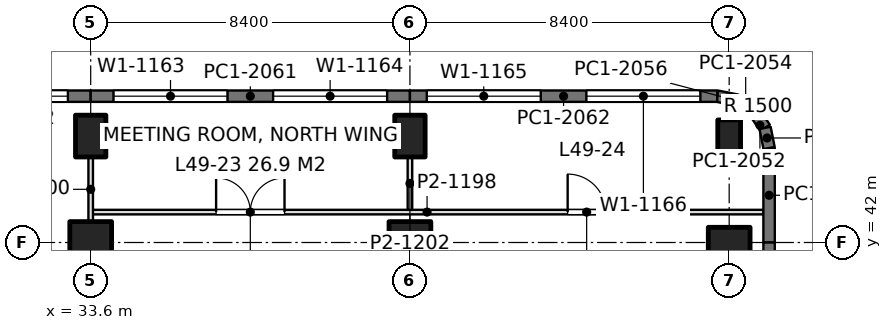
"""IFC4 building model, lengths in metres.
Left out: names, types, materials, properties, quantities, classifications, styles, units other than length and angle.
Written with IfcOpenShell. Run it as: python <this file> out.ifc"""

import sys

from ifc_helpers import new_model, si_unit, direction, frame, frame_2d, origin, origin_2d, place, context, subcontext, project, spatial, rectangle, extrude, element, fill, save


model = new_model("IFC4")
c1 = context("Model", 3, precision=1e-05, world=origin(), true_north=direction((0.0, 1.0)))
c2 = subcontext(c1, "Body", "Model", "MODEL_VIEW")
j1 = project(units=[si_unit("LENGTHUNIT", "METRE"), si_unit("PLANEANGLEUNIT", "RADIAN")], contexts=[c1])
p1 = place(None, origin())
s1 = spatial("IfcSite", under=j1, at=p1, CompositionType="ELEMENT")
p2 = place(p1, origin())
s2 = spatial("IfcBuilding", under=s1, at=p2, CompositionType="ELEMENT")
p3 = place(p2, frame((0.0, 0.0, 215.4)))
s3 = spatial("IfcBuildingStorey", under=s2, at=p3, CompositionType="ELEMENT", Elevation=215.4)
p4 = place(p3, frame((33.6, 42.0, 0.0), z_axis=(0.0, 0.0, 1.0), x_axis=(1.0, 0.0, 0.0)))
e1 = element("IfcColumn", 1, at=p4, inside=s3, PredefinedType="COLUMN", context=c2, shape_type="SweptSolid", body=[
    extrude(rectangle(XDim=1.1, YDim=1.1, at=origin_2d()), origin(), (0.0, 0.0, 1.0), 4.2),
])
p5 = place(p3, frame((33.6, 44.8, 0.0), z_axis=(0.0, 0.0, 1.0), x_axis=(1.0, 0.0, 0.0)))
e2 = element("IfcColumn", 2, at=p5, inside=s3, PredefinedType="COLUMN", context=c2, shape_type="SweptSolid", body=[
    extrude(rectangle(XDim=0.8, YDim=1.1, at=origin_2d()), origin(), (0.0, 0.0, 1.0), 4.2),
])
p6 = place(p3, frame((42.0, 42.0, 0.0), z_axis=(0.0, 0.0, 1.0), x_axis=(1.0, 0.0, 0.0)))
e3 = element("IfcColumn", 3, at=p6, inside=s3, PredefinedType="COLUMN", context=c2, shape_type="SweptSolid", body=[
    extrude(rectangle(XDim=1.1, YDim=1.1, at=origin_2d()), origin(), (0.0, 0.0, 1.0), 4.2),
])
for number, where, z_axis, x_axis in (
    (4, (42.0, 44.8, 0.0), (0.0, 0.0, 1.0), (1.0, 0.0, 0.0)),
    (5, (50.4, 42.0, 0.0), (0.0, 0.0, 1.0), (0.0, 1.0, 0.0)),
):
    element("IfcColumn", number, at=place(p3, frame(where, z_axis=z_axis, x_axis=x_axis)), inside=s3, PredefinedType="COLUMN", context=c2, shape_type="SweptSolid", body=[
        extrude(rectangle(XDim=0.8, YDim=1.1, at=origin_2d()), origin(), (0.0, 0.0, 1.0), 4.2),
    ])
p7 = place(p3, frame((50.4, 44.8, 0.0), z_axis=(0.0, 0.0, 1.0), x_axis=(1.0, 0.0, 0.0)))
e6 = element("IfcColumn", 6, at=p7, inside=s3, PredefinedType="COLUMN", context=c2, shape_type="SweptSolid", body=[
    extrude(rectangle(XDim=0.6, YDim=0.85, at=origin_2d()), origin(), (0.0, 0.0, 1.0), 4.2),
])
p8 = place(p3, frame((25.2, 45.85, 0.0), z_axis=(0.0, 0.0, 1.0), x_axis=(1.0, 0.0, 0.0)))
e7 = element("IfcWall", 7, at=p8, inside=s3, PredefinedType="SOLIDWALL", context=c2, shape_type="SweptSolid", body=[
    extrude(rectangle(XDim=8.4, YDim=0.3, at=frame_2d((4.2, 0.0))), origin(), (0.0, 0.0, 1.0), 4.05),
])
p9 = place(p8, frame((0.6, 0.0, 0.9)))
e8 = element("IfcOpeningElement", 8, at=p9, cuts=e7, PredefinedType="OPENING", context=c2, shape_type="SweptSolid", body=[
    extrude(rectangle(XDim=3.0, YDim=1.9, at=frame_2d((1.5, 0.95))), frame((0.0, 0.16, 0.0), z_axis=(0.0, -1.0, 0.0), x_axis=(1.0, 0.0, 0.0)), (0.0, 0.0, 1.0), 0.32),
])
p10 = place(p8, frame((4.8, 0.0, 0.9)))
e9 = element("IfcOpeningElement", 9, at=p10, cuts=e7, PredefinedType="OPENING", context=c2, shape_type="SweptSolid", body=[
    extrude(rectangle(XDim=3.0, YDim=1.9, at=frame_2d((1.5, 0.95))), frame((0.0, 0.16, 0.0), z_axis=(0.0, -1.0, 0.0), x_axis=(1.0, 0.0, 0.0)), (0.0, 0.0, 1.0), 0.32),
])
p11 = place(p3, frame((33.6, 45.85, 0.0), z_axis=(0.0, 0.0, 1.0), x_axis=(1.0, 0.0, 0.0)))
e10 = element("IfcWall", 10, at=p11, inside=s3, PredefinedType="SOLIDWALL", context=c2, shape_type="SweptSolid", body=[
    extrude(rectangle(XDim=8.4, YDim=0.3, at=frame_2d((4.2, 0.0))), origin(), (0.0, 0.0, 1.0), 4.05),
])
p12 = place(p11, frame((0.6, 0.0, 0.9)))
e11 = element("IfcOpeningElement", 11, at=p12, cuts=e10, PredefinedType="OPENING", context=c2, shape_type="SweptSolid", body=[
    extrude(rectangle(XDim=3.0, YDim=1.9, at=frame_2d((1.5, 0.95))), frame((0.0, 0.16, 0.0), z_axis=(0.0, -1.0, 0.0), x_axis=(1.0, 0.0, 0.0)), (0.0, 0.0, 1.0), 0.32),
])
p13 = place(p11, frame((4.8, 0.0, 0.9)))
e12 = element("IfcOpeningElement", 12, at=p13, cuts=e10, PredefinedType="OPENING", context=c2, shape_type="SweptSolid", body=[
    extrude(rectangle(XDim=3.0, YDim=1.9, at=frame_2d((1.5, 0.95))), frame((0.0, 0.16, 0.0), z_axis=(0.0, -1.0, 0.0), x_axis=(1.0, 0.0, 0.0)), (0.0, 0.0, 1.0), 0.32),
])
p14 = place(p3, frame((42.0, 45.85, 0.0), z_axis=(0.0, 0.0, 1.0), x_axis=(1.0, 0.0, 0.0)))
e13 = element("IfcWall", 13, at=p14, inside=s3, PredefinedType="SOLIDWALL", context=c2, shape_type="SweptSolid", body=[
    extrude(rectangle(XDim=8.085, YDim=0.3, at=frame_2d((4.042, 0.0))), origin(), (0.0, 0.0, 1.0), 4.05),
])
p15 = place(p14, frame((0.443, 0.0, 0.9)))
e14 = element("IfcOpeningElement", 14, at=p15, cuts=e13, PredefinedType="OPENING", context=c2, shape_type="SweptSolid", body=[
    extrude(rectangle(XDim=3.0, YDim=1.9, at=frame_2d((1.5, 0.95))), frame((0.0, 0.16, 0.0), z_axis=(0.0, -1.0, 0.0), x_axis=(1.0, 0.0, 0.0)), (0.0, 0.0, 1.0), 0.32),
])
p16 = place(p14, frame((4.643, 0.0, 0.9)))
e15 = element("IfcOpeningElement", 15, at=p16, cuts=e13, PredefinedType="OPENING", context=c2, shape_type="SweptSolid", body=[
    extrude(rectangle(XDim=3.0, YDim=1.9, at=frame_2d((1.5, 0.95))), frame((0.0, 0.16, 0.0), z_axis=(0.0, -1.0, 0.0), x_axis=(1.0, 0.0, 0.0)), (0.0, 0.0, 1.0), 0.32),
])
p17 = place(p3, frame((50.085, 45.85, 0.0), z_axis=(0.0, 0.0, 1.0), x_axis=(0.980702050465, -0.1955082817, 0.0)))
e16 = element("IfcWall", 16, at=p17, inside=s3, PredefinedType="SOLIDWALL", context=c2, shape_type="SweptSolid", body=[
    extrude(rectangle(XDim=0.541, YDim=0.3, at=frame_2d((0.271, 0.0))), origin(), (0.0, 0.0, 1.0), 4.05),
])
p18 = place(p3, frame((50.615, 45.744, 0.0), z_axis=(0.0, 0.0, 1.0), x_axis=(0.831692711774, -0.555236195849, 0.0)))
e17 = element("IfcWall", 17, at=p18, inside=s3, PredefinedType="SOLIDWALL", context=c2, shape_type="SweptSolid", body=[
    extrude(rectangle(XDim=0.525, YDim=0.3, at=frame_2d((0.263, 0.0))), origin(), (0.0, 0.0, 1.0), 4.05),
])
p19 = place(p3, frame((51.052, 45.453, 0.0), z_axis=(0.0, 0.0, 1.0), x_axis=(0.55534295404, -0.831621430339, 0.0)))
e18 = element("IfcWall", 18, at=p19, inside=s3, PredefinedType="SOLIDWALL", context=c2, shape_type="SweptSolid", body=[
    extrude(rectangle(XDim=0.526, YDim=0.3, at=frame_2d((0.263, 0.0))), origin(), (0.0, 0.0, 1.0), 4.05),
])
p20 = place(p3, frame((51.344, 45.015, 0.0), z_axis=(0.0, 0.0, 1.0), x_axis=(0.195073962632, -0.980788534345, 0.0)))
e19 = element("IfcWall", 19, at=p20, inside=s3, PredefinedType="SOLIDWALL", context=c2, shape_type="SweptSolid", body=[
    extrude(rectangle(XDim=0.541, YDim=0.3, at=frame_2d((0.271, 0.0))), origin(), (0.0, 0.0, 1.0), 4.05),
])
p21 = place(p3, frame((51.45, 44.485, 0.0), z_axis=(0.0, 0.0, 1.0), x_axis=(0.0, -1.0, 0.0)))
e20 = element("IfcWall", 20, at=p21, inside=s3, PredefinedType="SOLIDWALL", context=c2, shape_type="SweptSolid", body=[
    extrude(rectangle(XDim=2.485, YDim=0.3, at=frame_2d((1.243, 0.0))), origin(), (0.0, 0.0, 1.0), 4.05),
])
p22 = place(p3, frame((51.45, 42.0, 0.0), z_axis=(0.0, 0.0, 1.0), x_axis=(0.0, -1.0, 0.0)))
e21 = element("IfcWall", 21, at=p22, inside=s3, PredefinedType="SOLIDWALL", context=c2, shape_type="SweptSolid", body=[
    extrude(rectangle(XDim=4.275, YDim=0.3, at=frame_2d((2.137, 0.0))), origin(), (0.0, 0.0, 1.0), 4.05),
])
p23 = place(p22, frame((0.938, 0.0, 0.9)))
e22 = element("IfcOpeningElement", 22, at=p23, cuts=e21, PredefinedType="OPENING", context=c2, shape_type="SweptSolid", body=[
    extrude(rectangle(XDim=2.4, YDim=1.9, at=frame_2d((1.2, 0.95))), frame((0.0, 0.16, 0.0), z_axis=(0.0, -1.0, 0.0), x_axis=(1.0, 0.0, 0.0)), (0.0, 0.0, 1.0), 0.32),
])
p24 = place(p3, frame((33.6, 42.8, 0.0), z_axis=(0.0, 0.0, 1.0), x_axis=(1.0, 0.0, 0.0)))
e23 = element("IfcWall", 23, at=p24, inside=s3, PredefinedType="PARTITIONING", context=c2, shape_type="SweptSolid", body=[
    extrude(rectangle(XDim=17.702, YDim=0.12, at=frame_2d((8.851, 0.0))), origin(), (0.0, 0.0, 1.0), 3.56),
])
p25 = place(p24, frame((3.3, 0.0, 0.0)))
e24 = element("IfcOpeningElement", 24, at=p25, cuts=e23, PredefinedType="OPENING", context=c2, shape_type="SweptSolid", body=[
    extrude(rectangle(XDim=1.8, YDim=2.2, at=frame_2d((0.9, 1.1))), frame((0.0, 0.07, 0.0), z_axis=(0.0, -1.0, 0.0), x_axis=(1.0, 0.0, 0.0)), (0.0, 0.0, 1.0), 0.14),
])
p26 = place(p24, frame((12.55, 0.0, 0.0)))
e25 = element("IfcOpeningElement", 25, at=p26, cuts=e23, PredefinedType="OPENING", context=c2, shape_type="SweptSolid", body=[
    extrude(rectangle(XDim=1.0, YDim=2.4, at=frame_2d((0.5, 1.2))), frame((0.0, 0.07, 0.0), z_axis=(0.0, -1.0, 0.0), x_axis=(1.0, 0.0, 0.0)), (0.0, 0.0, 1.0), 0.14),
])
p27 = place(p3, frame((33.6, 42.548, 0.0), z_axis=(0.0, 0.0, 1.0), x_axis=(0.0, 1.0, 0.0)))
e26 = element("IfcWall", 26, at=p27, inside=s3, PredefinedType="PARTITIONING", context=c2, shape_type="SweptSolid", body=[
    extrude(rectangle(XDim=1.703, YDim=0.12, at=frame_2d((0.852, 0.0))), origin(), (0.0, 0.0, 1.0), 3.69),
])
p28 = place(p3, frame((42.0, 42.858, 0.0), z_axis=(0.0, 0.0, 1.0), x_axis=(0.0, 1.0, 0.0)))
e27 = element("IfcWall", 27, at=p28, inside=s3, PredefinedType="PARTITIONING", context=c2, shape_type="SweptSolid", body=[
    extrude(rectangle(XDim=1.393, YDim=0.12, at=frame_2d((0.697, 0.0))), origin(), (0.0, 0.0, 1.0), 3.69),
])
p29 = place(p10, origin())
e28 = element("IfcWindow", 28, at=p29, inside=s3, PartitioningType="SINGLE_PANEL", PredefinedType="WINDOW", context=c2, shape_type="SweptSolid", body=[
    extrude(rectangle(XDim=3.0, YDim=1.9, at=frame_2d((1.5, 0.95))), frame((0.0, 0.03, 0.0), z_axis=(0.0, -1.0, 0.0), x_axis=(1.0, 0.0, 0.0)), (0.0, 0.0, 1.0), 0.06),
])
fill(e9, e28)
p30 = place(p12, origin())
e29 = element("IfcWindow", 29, at=p30, inside=s3, PartitioningType="SINGLE_PANEL", PredefinedType="WINDOW", context=c2, shape_type="SweptSolid", body=[
    extrude(rectangle(XDim=3.0, YDim=1.9, at=frame_2d((1.5, 0.95))), frame((0.0, 0.03, 0.0), z_axis=(0.0, -1.0, 0.0), x_axis=(1.0, 0.0, 0.0)), (0.0, 0.0, 1.0), 0.06),
])
fill(e11, e29)
p31 = place(p13, origin())
e30 = element("IfcWindow", 30, at=p31, inside=s3, PartitioningType="SINGLE_PANEL", PredefinedType="WINDOW", context=c2, shape_type="SweptSolid", body=[
    extrude(rectangle(XDim=3.0, YDim=1.9, at=frame_2d((1.5, 0.95))), frame((0.0, 0.03, 0.0), z_axis=(0.0, -1.0, 0.0), x_axis=(1.0, 0.0, 0.0)), (0.0, 0.0, 1.0), 0.06),
])
fill(e12, e30)
p32 = place(p15, origin())
e31 = element("IfcWindow", 31, at=p32, inside=s3, PartitioningType="SINGLE_PANEL", PredefinedType="WINDOW", context=c2, shape_type="SweptSolid", body=[
    extrude(rectangle(XDim=3.0, YDim=1.9, at=frame_2d((1.5, 0.95))), frame((0.0, 0.03, 0.0), z_axis=(0.0, -1.0, 0.0), x_axis=(1.0, 0.0, 0.0)), (0.0, 0.0, 1.0), 0.06),
])
fill(e14, e31)
p33 = place(p16, origin())
e32 = element("IfcWindow", 32, at=p33, inside=s3, PartitioningType="SINGLE_PANEL", PredefinedType="WINDOW", context=c2, shape_type="SweptSolid", body=[
    extrude(rectangle(XDim=3.0, YDim=1.9, at=frame_2d((1.5, 0.95))), frame((0.0, 0.03, 0.0), z_axis=(0.0, -1.0, 0.0), x_axis=(1.0, 0.0, 0.0)), (0.0, 0.0, 1.0), 0.06),
])
fill(e15, e32)
p34 = place(p25, origin())
e33 = element("IfcDoor", 33, at=p34, inside=s3, OperationType="DOUBLE_DOOR_SINGLE_SWING", PredefinedType="DOOR", context=c2, shape_type="SweptSolid", body=[
    extrude(rectangle(XDim=1.8, YDim=2.2, at=frame_2d((0.9, 1.1))), frame((0.0, 0.025, 0.0), z_axis=(0.0, -1.0, 0.0), x_axis=(1.0, 0.0, 0.0)), (0.0, 0.0, 1.0), 0.05),
])
fill(e24, e33)
p35 = place(p26, origin())
e34 = element("IfcDoor", 34, at=p35, inside=s3, OperationType="SINGLE_SWING_LEFT", PredefinedType="DOOR", context=c2, shape_type="SweptSolid", body=[
    extrude(rectangle(XDim=1.0, YDim=2.4, at=frame_2d((0.5, 1.2))), frame((0.0, 0.025, 0.0), z_axis=(0.0, -1.0, 0.0), x_axis=(1.0, 0.0, 0.0)), (0.0, 0.0, 1.0), 0.05),
])
fill(e25, e34)
save(model, sys.argv[1])
